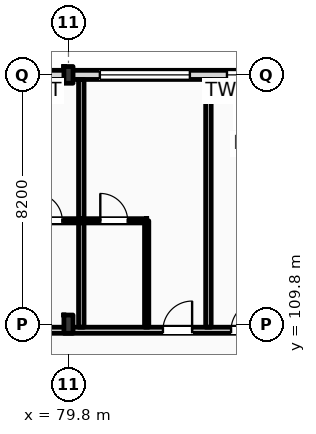
"""IFC4 building model, lengths in metres.
Left out: names, types, materials, properties, quantities, classifications, styles, units other than length and angle.
Written with IfcOpenShell. Run it as: python <this file> out.ifc"""

import sys

from ifc_helpers import new_model, si_unit, direction, frame, frame_2d, origin, origin_2d, place, context, subcontext, project, spatial, rectangle, i_section, extrude, element, fill, save


model = new_model("IFC4")
c1 = context("Model", 3, precision=1e-05, world=origin(), true_north=direction((0.0, 1.0)))
c2 = subcontext(c1, "Body", "Model", "MODEL_VIEW")
j1 = project(units=[si_unit("LENGTHUNIT", "METRE"), si_unit("PLANEANGLEUNIT", "RADIAN")], contexts=[c1])
p1 = place(None, origin())
s1 = spatial("IfcSite", under=j1, at=p1, CompositionType="ELEMENT")
p2 = place(p1, origin())
s2 = spatial("IfcBuilding", under=s1, at=p2, CompositionType="ELEMENT")
p3 = place(p2, frame((0.0, 0.0, 16.2)))
s3 = spatial("IfcBuildingStorey", under=s2, at=p3, CompositionType="ELEMENT", Elevation=16.2)
p4 = place(p3, frame((79.8, 109.8, 0.0), z_axis=(0.0, 0.0, 1.0), x_axis=(1.0, 0.0, 0.0)))
e1 = element("IfcColumn", 1, at=p4, inside=s3, PredefinedType="COLUMN", context=c2, shape_type="SweptSolid", body=[
    extrude(i_section(OverallWidth=0.3, OverallDepth=0.6, WebThickness=0.015, FlangeThickness=0.03, FilletRadius=0.027, at=origin_2d()), origin(), (0.0, 0.0, 1.0), 4.2),
])
p5 = place(p3, frame((79.8, 118.0, 0.0), z_axis=(0.0, 0.0, 1.0), x_axis=(1.0, 0.0, 0.0)))
e2 = element("IfcColumn", 2, at=p5, inside=s3, PredefinedType="COLUMN", context=c2, shape_type="SweptSolid", body=[
    extrude(i_section(OverallWidth=0.3, OverallDepth=0.55, WebThickness=0.015, FlangeThickness=0.029, FilletRadius=0.027, at=origin_2d()), origin(), (0.0, 0.0, 1.0), 4.2),
])
p6 = place(p3, frame((22.5, 118.0, 0.0), z_axis=(0.0, 0.0, 1.0), x_axis=(1.0, 0.0, 0.0)))
e3 = element("IfcWall", 3, at=p6, inside=s3, PredefinedType="STANDARD", context=c2, shape_type="SweptSolid", body=[
    extrude(rectangle(XDim=97.5, YDim=0.3, at=frame_2d((48.75, 0.0))), origin(), (0.0, 0.0, 1.0), 3.36),
])
p7 = place(p6, frame((3.721, 0.0, 0.9)))
e4 = element("IfcOpeningElement", 4, at=p7, cuts=e3, PredefinedType="OPENING", context=c2, shape_type="SweptSolid", body=[
    extrude(rectangle(XDim=0.9, YDim=1.8, at=frame_2d((0.45, 0.9))), frame((0.0, 0.16, 0.0), z_axis=(0.0, -1.0, 0.0), x_axis=(1.0, 0.0, 0.0)), (0.0, 0.0, 1.0), 0.32),
])
p8 = place(p6, frame((6.447, 0.0, 0.9)))
e5 = element("IfcOpeningElement", 5, at=p8, cuts=e3, PredefinedType="OPENING", context=c2, shape_type="SweptSolid", body=[
    extrude(rectangle(XDim=1.35, YDim=1.85, at=frame_2d((0.675, 0.925))), frame((0.0, 0.16, 0.0), z_axis=(0.0, -1.0, 0.0), x_axis=(1.0, 0.0, 0.0)), (0.0, 0.0, 1.0), 0.32),
])
p9 = place(p6, frame((11.363, 0.0, 0.9)))
e6 = element("IfcOpeningElement", 6, at=p9, cuts=e3, PredefinedType="OPENING", context=c2, shape_type="SweptSolid", body=[
    extrude(rectangle(XDim=1.5, YDim=1.9, at=frame_2d((0.75, 0.95))), frame((0.0, 0.16, 0.0), z_axis=(0.0, -1.0, 0.0), x_axis=(1.0, 0.0, 0.0)), (0.0, 0.0, 1.0), 0.32),
])
p10 = place(p6, frame((15.078, 0.0, 0.9)))
e7 = element("IfcOpeningElement", 7, at=p10, cuts=e3, PredefinedType="OPENING", context=c2, shape_type="SweptSolid", body=[
    extrude(rectangle(XDim=1.65, YDim=1.95, at=frame_2d((0.825, 0.975))), frame((0.0, 0.16, 0.0), z_axis=(0.0, -1.0, 0.0), x_axis=(1.0, 0.0, 0.0)), (0.0, 0.0, 1.0), 0.32),
])
p11 = place(p6, frame((19.395, 0.0, 0.9)))
e8 = element("IfcOpeningElement", 8, at=p11, cuts=e3, PredefinedType="OPENING", context=c2, shape_type="SweptSolid", body=[
    extrude(rectangle(XDim=1.8, YDim=2.0, at=frame_2d((0.9, 1.0))), frame((0.0, 0.16, 0.0), z_axis=(0.0, -1.0, 0.0), x_axis=(1.0, 0.0, 0.0)), (0.0, 0.0, 1.0), 0.32),
])
p12 = place(p6, frame((23.31, 0.0, 0.9)))
e9 = element("IfcOpeningElement", 9, at=p12, cuts=e3, PredefinedType="OPENING", context=c2, shape_type="SweptSolid", body=[
    extrude(rectangle(XDim=1.95, YDim=2.05, at=frame_2d((0.975, 1.025))), frame((0.0, 0.16, 0.0), z_axis=(0.0, -1.0, 0.0), x_axis=(1.0, 0.0, 0.0)), (0.0, 0.0, 1.0), 0.32),
])
p13 = place(p6, frame((28.026, 0.0, 0.9)))
e10 = element("IfcOpeningElement", 10, at=p13, cuts=e3, PredefinedType="OPENING", context=c2, shape_type="SweptSolid", body=[
    extrude(rectangle(XDim=2.1, YDim=2.1, at=frame_2d((1.05, 1.05))), frame((0.0, 0.16, 0.0), z_axis=(0.0, -1.0, 0.0), x_axis=(1.0, 0.0, 0.0)), (0.0, 0.0, 1.0), 0.32),
])
p14 = place(p6, frame((31.941, 0.0, 0.9)))
e11 = element("IfcOpeningElement", 11, at=p14, cuts=e3, PredefinedType="OPENING", context=c2, shape_type="SweptSolid", body=[
    extrude(rectangle(XDim=1.1, YDim=2.15, at=frame_2d((0.55, 1.075))), frame((0.0, 0.16, 0.0), z_axis=(0.0, -1.0, 0.0), x_axis=(1.0, 0.0, 0.0)), (0.0, 0.0, 1.0), 0.32),
])
p15 = place(p6, frame((36.657, 0.0, 0.9)))
e12 = element("IfcOpeningElement", 12, at=p15, cuts=e3, PredefinedType="OPENING", context=c2, shape_type="SweptSolid", body=[
    extrude(rectangle(XDim=2.4, YDim=2.2, at=frame_2d((1.2, 1.1))), frame((0.0, 0.16, 0.0), z_axis=(0.0, -1.0, 0.0), x_axis=(1.0, 0.0, 0.0)), (0.0, 0.0, 1.0), 0.32),
])
p16 = place(p6, frame((42.574, 0.0, 0.9)))
e13 = element("IfcOpeningElement", 13, at=p16, cuts=e3, PredefinedType="OPENING", context=c2, shape_type="SweptSolid", body=[
    extrude(rectangle(XDim=1.35, YDim=2.25, at=frame_2d((0.675, 1.125))), frame((0.0, 0.16, 0.0), z_axis=(0.0, -1.0, 0.0), x_axis=(1.0, 0.0, 0.0)), (0.0, 0.0, 1.0), 0.32),
])
p17 = place(p6, frame((45.289, 0.0, 0.9)))
e14 = element("IfcOpeningElement", 14, at=p17, cuts=e3, PredefinedType="OPENING", context=c2, shape_type="SweptSolid", body=[
    extrude(rectangle(XDim=2.7, YDim=2.28, at=frame_2d((1.35, 1.14))), frame((0.0, 0.16, 0.0), z_axis=(0.0, -1.0, 0.0), x_axis=(1.0, 0.0, 0.0)), (0.0, 0.0, 1.0), 0.32),
])
p18 = place(p6, frame((50.406, 0.0, 0.9)))
e15 = element("IfcOpeningElement", 15, at=p18, cuts=e3, PredefinedType="OPENING", context=c2, shape_type="SweptSolid", body=[
    extrude(rectangle(XDim=1.8, YDim=2.28, at=frame_2d((0.9, 1.14))), frame((0.0, 0.16, 0.0), z_axis=(0.0, -1.0, 0.0), x_axis=(1.0, 0.0, 0.0)), (0.0, 0.0, 1.0), 0.32),
])
p19 = place(p6, frame((53.922, 0.0, 0.9)))
e16 = element("IfcOpeningElement", 16, at=p19, cuts=e3, PredefinedType="OPENING", context=c2, shape_type="SweptSolid", body=[
    extrude(rectangle(XDim=1.8, YDim=2.28, at=frame_2d((0.9, 1.14))), frame((0.0, 0.16, 0.0), z_axis=(0.0, -1.0, 0.0), x_axis=(1.0, 0.0, 0.0)), (0.0, 0.0, 1.0), 0.32),
])
p20 = place(p6, frame((58.332, 0.0, 0.9)))
e17 = element("IfcOpeningElement", 17, at=p20, cuts=e3, PredefinedType="OPENING", context=c2, shape_type="SweptSolid", body=[
    extrude(rectangle(XDim=2.961, YDim=2.28, at=frame_2d((1.48, 1.14))), frame((0.0, 0.16, 0.0), z_axis=(0.0, -1.0, 0.0), x_axis=(1.0, 0.0, 0.0)), (0.0, 0.0, 1.0), 0.32),
])
p21 = place(p6, frame((62.513, 0.0, 0.9)))
e18 = element("IfcOpeningElement", 18, at=p21, cuts=e3, PredefinedType="OPENING", context=c2, shape_type="SweptSolid", body=[
    extrude(rectangle(XDim=1.8, YDim=2.28, at=frame_2d((0.9, 1.14))), frame((0.0, 0.16, 0.0), z_axis=(0.0, -1.0, 0.0), x_axis=(1.0, 0.0, 0.0)), (0.0, 0.0, 1.0), 0.32),
])
p22 = place(p6, frame((67.114, 0.0, 0.9)))
e19 = element("IfcOpeningElement", 19, at=p22, cuts=e3, PredefinedType="OPENING", context=c2, shape_type="SweptSolid", body=[
    extrude(rectangle(XDim=2.961, YDim=2.28, at=frame_2d((1.48, 1.14))), frame((0.0, 0.16, 0.0), z_axis=(0.0, -1.0, 0.0), x_axis=(1.0, 0.0, 0.0)), (0.0, 0.0, 1.0), 0.32),
])
p23 = place(p6, frame((73.695, 0.0, 0.9)))
e20 = element("IfcOpeningElement", 20, at=p23, cuts=e3, PredefinedType="OPENING", context=c2, shape_type="SweptSolid", body=[
    extrude(rectangle(XDim=1.1, YDim=2.28, at=frame_2d((0.55, 1.14))), frame((0.0, 0.16, 0.0), z_axis=(0.0, -1.0, 0.0), x_axis=(1.0, 0.0, 0.0)), (0.0, 0.0, 1.0), 0.32),
])
p24 = place(p6, frame((75.895, 0.0, 0.9)))
e21 = element("IfcOpeningElement", 21, at=p24, cuts=e3, PredefinedType="OPENING", context=c2, shape_type="SweptSolid", body=[
    extrude(rectangle(XDim=2.961, YDim=2.28, at=frame_2d((1.48, 1.14))), frame((0.0, 0.16, 0.0), z_axis=(0.0, -1.0, 0.0), x_axis=(1.0, 0.0, 0.0)), (0.0, 0.0, 1.0), 0.32),
])
p25 = place(p6, frame((81.676, 0.0, 0.9)))
e22 = element("IfcOpeningElement", 22, at=p25, cuts=e3, PredefinedType="OPENING", context=c2, shape_type="SweptSolid", body=[
    extrude(rectangle(XDim=1.8, YDim=2.28, at=frame_2d((0.9, 1.14))), frame((0.0, 0.16, 0.0), z_axis=(0.0, -1.0, 0.0), x_axis=(1.0, 0.0, 0.0)), (0.0, 0.0, 1.0), 0.32),
])
p26 = place(p6, frame((84.677, 0.0, 0.9)))
e23 = element("IfcOpeningElement", 23, at=p26, cuts=e3, PredefinedType="OPENING", context=c2, shape_type="SweptSolid", body=[
    extrude(rectangle(XDim=2.961, YDim=2.28, at=frame_2d((1.48, 1.14))), frame((0.0, 0.16, 0.0), z_axis=(0.0, -1.0, 0.0), x_axis=(1.0, 0.0, 0.0)), (0.0, 0.0, 1.0), 0.32),
])
p27 = place(p6, frame((89.999, 0.0, 0.9)))
e24 = element("IfcOpeningElement", 24, at=p27, cuts=e3, PredefinedType="OPENING", context=c2, shape_type="SweptSolid", body=[
    extrude(rectangle(XDim=1.1, YDim=1.5, at=frame_2d((0.55, 0.75))), frame((0.0, 0.16, 0.0), z_axis=(0.0, -1.0, 0.0), x_axis=(1.0, 0.0, 0.0)), (0.0, 0.0, 1.0), 0.32),
])
p28 = place(p6, frame((94.35, 0.0, 0.9)))
e25 = element("IfcOpeningElement", 25, at=p28, cuts=e3, PredefinedType="OPENING", context=c2, shape_type="SweptSolid", body=[
    extrude(rectangle(XDim=1.25, YDim=1.6, at=frame_2d((0.625, 0.8))), frame((0.0, 0.16, 0.0), z_axis=(0.0, -1.0, 0.0), x_axis=(1.0, 0.0, 0.0)), (0.0, 0.0, 1.0), 0.32),
])
p29 = place(p3, frame((10.65, 109.6, 0.0), z_axis=(0.0, 0.0, 1.0), x_axis=(1.0, 0.0, 0.0)))
e26 = element("IfcWall", 26, at=p29, inside=s3, PredefinedType="PARTITIONING", context=c2, shape_type="SweptSolid", body=[
    extrude(rectangle(XDim=109.21, YDim=0.2, at=frame_2d((54.605, 0.0))), origin(), (0.0, 0.0, 1.0), 3.36),
])
p30 = place(p29, frame((15.43, 0.0, 0.0)))
e27 = element("IfcOpeningElement", 27, at=p30, cuts=e26, PredefinedType="OPENING", context=c2, shape_type="SweptSolid", body=[
    extrude(rectangle(XDim=1.02, YDim=2.2, at=frame_2d((0.51, 1.1))), frame((0.0, 0.11, 0.0), z_axis=(0.0, -1.0, 0.0), x_axis=(1.0, 0.0, 0.0)), (0.0, 0.0, 1.0), 0.22),
])
p31 = place(p29, frame((19.537, 0.0, 0.0)))
e28 = element("IfcOpeningElement", 28, at=p31, cuts=e26, PredefinedType="OPENING", context=c2, shape_type="SweptSolid", body=[
    extrude(rectangle(XDim=1.02, YDim=2.2, at=frame_2d((0.51, 1.1))), frame((0.0, 0.11, 0.0), z_axis=(0.0, -1.0, 0.0), x_axis=(1.0, 0.0, 0.0)), (0.0, 0.0, 1.0), 0.22),
])
p32 = place(p29, frame((23.928, 0.0, 0.0)))
e29 = element("IfcOpeningElement", 29, at=p32, cuts=e26, PredefinedType="OPENING", context=c2, shape_type="SweptSolid", body=[
    extrude(rectangle(XDim=1.02, YDim=2.2, at=frame_2d((0.51, 1.1))), frame((0.0, 0.11, 0.0), z_axis=(0.0, -1.0, 0.0), x_axis=(1.0, 0.0, 0.0)), (0.0, 0.0, 1.0), 0.22),
])
p33 = place(p29, frame((26.169, 0.0, 0.0)))
e30 = element("IfcOpeningElement", 30, at=p33, cuts=e26, PredefinedType="OPENING", context=c2, shape_type="SweptSolid", body=[
    extrude(rectangle(XDim=1.02, YDim=2.2, at=frame_2d((0.51, 1.1))), frame((0.0, 0.11, 0.0), z_axis=(0.0, -1.0, 0.0), x_axis=(1.0, 0.0, 0.0)), (0.0, 0.0, 1.0), 0.22),
])
p34 = place(p29, frame((32.739, 0.0, 0.0)))
e31 = element("IfcOpeningElement", 31, at=p34, cuts=e26, PredefinedType="OPENING", context=c2, shape_type="SweptSolid", body=[
    extrude(rectangle(XDim=0.96, YDim=2.2, at=frame_2d((0.48, 1.1))), frame((0.0, 0.11, 0.0), z_axis=(0.0, -1.0, 0.0), x_axis=(1.0, 0.0, 0.0)), (0.0, 0.0, 1.0), 0.22),
])
p35 = place(p29, frame((34.98, 0.0, 0.0)))
e32 = element("IfcOpeningElement", 32, at=p35, cuts=e26, PredefinedType="OPENING", context=c2, shape_type="SweptSolid", body=[
    extrude(rectangle(XDim=0.96, YDim=2.2, at=frame_2d((0.48, 1.1))), frame((0.0, 0.11, 0.0), z_axis=(0.0, -1.0, 0.0), x_axis=(1.0, 0.0, 0.0)), (0.0, 0.0, 1.0), 0.22),
])
p36 = place(p29, frame((41.521, 0.0, 0.0)))
e33 = element("IfcOpeningElement", 33, at=p36, cuts=e26, PredefinedType="OPENING", context=c2, shape_type="SweptSolid", body=[
    extrude(rectangle(XDim=0.96, YDim=2.2, at=frame_2d((0.48, 1.1))), frame((0.0, 0.11, 0.0), z_axis=(0.0, -1.0, 0.0), x_axis=(1.0, 0.0, 0.0)), (0.0, 0.0, 1.0), 0.22),
])
p37 = place(p29, frame((43.512, 0.0, 0.0)))
e34 = element("IfcOpeningElement", 34, at=p37, cuts=e26, PredefinedType="OPENING", context=c2, shape_type="SweptSolid", body=[
    extrude(rectangle(XDim=0.96, YDim=2.2, at=frame_2d((0.48, 1.1))), frame((0.0, 0.11, 0.0), z_axis=(0.0, -1.0, 0.0), x_axis=(1.0, 0.0, 0.0)), (0.0, 0.0, 1.0), 0.22),
])
p38 = place(p29, frame((50.303, 0.0, 0.0)))
e35 = element("IfcOpeningElement", 35, at=p38, cuts=e26, PredefinedType="OPENING", context=c2, shape_type="SweptSolid", body=[
    extrude(rectangle(XDim=0.96, YDim=2.2, at=frame_2d((0.48, 1.1))), frame((0.0, 0.11, 0.0), z_axis=(0.0, -1.0, 0.0), x_axis=(1.0, 0.0, 0.0)), (0.0, 0.0, 1.0), 0.22),
])
p39 = place(p29, frame((54.944, 0.0, 0.0)))
e36 = element("IfcOpeningElement", 36, at=p39, cuts=e26, PredefinedType="OPENING", context=c2, shape_type="SweptSolid", body=[
    extrude(rectangle(XDim=0.96, YDim=2.2, at=frame_2d((0.48, 1.1))), frame((0.0, 0.11, 0.0), z_axis=(0.0, -1.0, 0.0), x_axis=(1.0, 0.0, 0.0)), (0.0, 0.0, 1.0), 0.22),
])
p40 = place(p29, frame((59.085, 0.0, 0.0)))
e37 = element("IfcOpeningElement", 37, at=p40, cuts=e26, PredefinedType="OPENING", context=c2, shape_type="SweptSolid", body=[
    extrude(rectangle(XDim=0.96, YDim=2.2, at=frame_2d((0.48, 1.1))), frame((0.0, 0.11, 0.0), z_axis=(0.0, -1.0, 0.0), x_axis=(1.0, 0.0, 0.0)), (0.0, 0.0, 1.0), 0.22),
])
p41 = place(p29, frame((63.476, 0.0, 0.0)))
e38 = element("IfcOpeningElement", 38, at=p41, cuts=e26, PredefinedType="OPENING", context=c2, shape_type="SweptSolid", body=[
    extrude(rectangle(XDim=0.96, YDim=2.2, at=frame_2d((0.48, 1.1))), frame((0.0, 0.11, 0.0), z_axis=(0.0, -1.0, 0.0), x_axis=(1.0, 0.0, 0.0)), (0.0, 0.0, 1.0), 0.22),
])
p42 = place(p29, frame((65.716, 0.0, 0.0)))
e39 = element("IfcOpeningElement", 39, at=p42, cuts=e26, PredefinedType="OPENING", context=c2, shape_type="SweptSolid", body=[
    extrude(rectangle(XDim=0.96, YDim=2.2, at=frame_2d((0.48, 1.1))), frame((0.0, 0.11, 0.0), z_axis=(0.0, -1.0, 0.0), x_axis=(1.0, 0.0, 0.0)), (0.0, 0.0, 1.0), 0.22),
])
p43 = place(p29, frame((72.257, 0.0, 0.0)))
e40 = element("IfcOpeningElement", 40, at=p43, cuts=e26, PredefinedType="OPENING", context=c2, shape_type="SweptSolid", body=[
    extrude(rectangle(XDim=0.96, YDim=2.2, at=frame_2d((0.48, 1.1))), frame((0.0, 0.11, 0.0), z_axis=(0.0, -1.0, 0.0), x_axis=(1.0, 0.0, 0.0)), (0.0, 0.0, 1.0), 0.22),
])
p44 = place(p29, frame((74.498, 0.0, 0.0)))
e41 = element("IfcOpeningElement", 41, at=p44, cuts=e26, PredefinedType="OPENING", context=c2, shape_type="SweptSolid", body=[
    extrude(rectangle(XDim=0.96, YDim=2.2, at=frame_2d((0.48, 1.1))), frame((0.0, 0.11, 0.0), z_axis=(0.0, -1.0, 0.0), x_axis=(1.0, 0.0, 0.0)), (0.0, 0.0, 1.0), 0.22),
])
p45 = place(p29, frame((81.039, 0.0, 0.0)))
e42 = element("IfcOpeningElement", 42, at=p45, cuts=e26, PredefinedType="OPENING", context=c2, shape_type="SweptSolid", body=[
    extrude(rectangle(XDim=0.96, YDim=2.2, at=frame_2d((0.48, 1.1))), frame((0.0, 0.11, 0.0), z_axis=(0.0, -1.0, 0.0), x_axis=(1.0, 0.0, 0.0)), (0.0, 0.0, 1.0), 0.22),
])
p46 = place(p29, frame((85.68, 0.0, 0.0)))
e43 = element("IfcOpeningElement", 43, at=p46, cuts=e26, PredefinedType="OPENING", context=c2, shape_type="SweptSolid", body=[
    extrude(rectangle(XDim=0.96, YDim=2.2, at=frame_2d((0.48, 1.1))), frame((0.0, 0.11, 0.0), z_axis=(0.0, -1.0, 0.0), x_axis=(1.0, 0.0, 0.0)), (0.0, 0.0, 1.0), 0.22),
])
p47 = place(p29, frame((89.82, 0.0, 0.0)))
e44 = element("IfcOpeningElement", 44, at=p47, cuts=e26, PredefinedType="OPENING", context=c2, shape_type="SweptSolid", body=[
    extrude(rectangle(XDim=0.96, YDim=2.2, at=frame_2d((0.48, 1.1))), frame((0.0, 0.11, 0.0), z_axis=(0.0, -1.0, 0.0), x_axis=(1.0, 0.0, 0.0)), (0.0, 0.0, 1.0), 0.22),
])
p48 = place(p29, frame((94.211, 0.0, 0.0)))
e45 = element("IfcOpeningElement", 45, at=p48, cuts=e26, PredefinedType="OPENING", context=c2, shape_type="SweptSolid", body=[
    extrude(rectangle(XDim=0.96, YDim=2.2, at=frame_2d((0.48, 1.1))), frame((0.0, 0.11, 0.0), z_axis=(0.0, -1.0, 0.0), x_axis=(1.0, 0.0, 0.0)), (0.0, 0.0, 1.0), 0.22),
])
p49 = place(p29, frame((98.602, 0.0, 0.0)))
e46 = element("IfcOpeningElement", 46, at=p49, cuts=e26, PredefinedType="OPENING", context=c2, shape_type="SweptSolid", body=[
    extrude(rectangle(XDim=0.96, YDim=2.2, at=frame_2d((0.48, 1.1))), frame((0.0, 0.11, 0.0), z_axis=(0.0, -1.0, 0.0), x_axis=(1.0, 0.0, 0.0)), (0.0, 0.0, 1.0), 0.22),
])
p50 = place(p29, frame((102.993, 0.0, 0.0)))
e47 = element("IfcOpeningElement", 47, at=p50, cuts=e26, PredefinedType="OPENING", context=c2, shape_type="SweptSolid", body=[
    extrude(rectangle(XDim=0.96, YDim=2.2, at=frame_2d((0.48, 1.1))), frame((0.0, 0.11, 0.0), z_axis=(0.0, -1.0, 0.0), x_axis=(1.0, 0.0, 0.0)), (0.0, 0.0, 1.0), 0.22),
])
p51 = place(p29, frame((105.269, 0.0, 0.0)))
e48 = element("IfcOpeningElement", 48, at=p51, cuts=e26, PredefinedType="OPENING", context=c2, shape_type="SweptSolid", body=[
    extrude(rectangle(XDim=0.96, YDim=2.2, at=frame_2d((0.48, 1.1))), frame((0.0, 0.11, 0.0), z_axis=(0.0, -1.0, 0.0), x_axis=(1.0, 0.0, 0.0)), (0.0, 0.0, 1.0), 0.22),
])
p52 = place(p29, frame((2.716, 0.0, 0.0)))
e49 = element("IfcOpeningElement", 49, at=p52, cuts=e26, PredefinedType="OPENING", context=c2, shape_type="SweptSolid", body=[
    extrude(rectangle(XDim=1.35, YDim=2.25, at=frame_2d((0.675, 1.125))), frame((0.0, 0.11, 0.0), z_axis=(0.0, -1.0, 0.0), x_axis=(1.0, 0.0, 0.0)), (0.0, 0.0, 1.0), 0.22),
])
p53 = place(p29, frame((6.65, 0.0, 0.0)))
e50 = element("IfcOpeningElement", 50, at=p53, cuts=e26, PredefinedType="OPENING", context=c2, shape_type="SweptSolid", body=[
    extrude(rectangle(XDim=1.35, YDim=2.25, at=frame_2d((0.675, 1.125))), frame((0.0, 0.11, 0.0), z_axis=(0.0, -1.0, 0.0), x_axis=(1.0, 0.0, 0.0)), (0.0, 0.0, 1.0), 0.22),
])
p54 = place(p29, frame((10.583, 0.0, 0.0)))
e51 = element("IfcOpeningElement", 51, at=p54, cuts=e26, PredefinedType="OPENING", context=c2, shape_type="SweptSolid", body=[
    extrude(rectangle(XDim=1.35, YDim=2.25, at=frame_2d((0.675, 1.125))), frame((0.0, 0.11, 0.0), z_axis=(0.0, -1.0, 0.0), x_axis=(1.0, 0.0, 0.0)), (0.0, 0.0, 1.0), 0.22),
])
p55 = place(p3, frame((80.222, 109.7, 0.0), z_axis=(0.0, 0.0, 1.0), x_axis=(0.0, 1.0, 0.0)))
e52 = element("IfcWall", 52, at=p55, inside=s3, PredefinedType="PARTITIONING", context=c2, shape_type="SweptSolid", body=[
    extrude(rectangle(XDim=8.15, YDim=0.18, at=frame_2d((4.075, 0.0))), origin(), (0.0, 0.0, 1.0), 3.92),
])
p56 = place(p3, frame((78.072, 113.2, 0.0), z_axis=(0.0, 0.0, 1.0), x_axis=(1.0, 0.0, 0.0)))
e53 = element("IfcWall", 53, at=p56, inside=s3, PredefinedType="PARTITIONING", context=c2, shape_type="SweptSolid", body=[
    extrude(rectangle(XDim=2.15, YDim=0.14, at=frame_2d((1.075, 0.0))), origin(), (0.0, 0.0, 1.0), 3.92),
])
p57 = place(p56, frame((0.625, 0.0, 0.0)))
e54 = element("IfcOpeningElement", 54, at=p57, cuts=e53, PredefinedType="OPENING", context=c2, shape_type="SweptSolid", body=[
    extrude(rectangle(XDim=0.9, YDim=2.1, at=frame_2d((0.45, 1.05))), frame((0.0, 0.08, 0.0), z_axis=(0.0, -1.0, 0.0), x_axis=(1.0, 0.0, 0.0)), (0.0, 0.0, 1.0), 0.16),
])
p58 = place(p3, frame((84.403, 109.7, 0.0), z_axis=(0.0, 0.0, 1.0), x_axis=(0.0, 1.0, 0.0)))
e55 = element("IfcWall", 55, at=p58, inside=s3, PredefinedType="PARTITIONING", context=c2, shape_type="SweptSolid", body=[
    extrude(rectangle(XDim=8.15, YDim=0.18, at=frame_2d((4.075, 0.0))), origin(), (0.0, 0.0, 1.0), 3.92),
])
p59 = place(p3, frame((82.372, 109.7, 0.0), z_axis=(0.0, 0.0, 1.0), x_axis=(0.0, 1.0, 0.0)))
e56 = element("IfcWall", 56, at=p59, inside=s3, PredefinedType="PARTITIONING", context=c2, shape_type="SweptSolid", body=[
    extrude(rectangle(XDim=3.5, YDim=0.14, at=frame_2d((1.75, 0.0))), origin(), (0.0, 0.0, 1.0), 3.61),
])
p60 = place(p3, frame((80.222, 113.2, 0.0), z_axis=(0.0, 0.0, 1.0), x_axis=(1.0, 0.0, 0.0)))
e57 = element("IfcWall", 57, at=p60, inside=s3, PredefinedType="PARTITIONING", context=c2, shape_type="SweptSolid", body=[
    extrude(rectangle(XDim=2.15, YDim=0.14, at=frame_2d((1.075, 0.0))), origin(), (0.0, 0.0, 1.0), 3.92),
])
p61 = place(p60, frame((0.625, 0.0, 0.0)))
e58 = element("IfcOpeningElement", 58, at=p61, cuts=e57, PredefinedType="OPENING", context=c2, shape_type="SweptSolid", body=[
    extrude(rectangle(XDim=0.9, YDim=2.1, at=frame_2d((0.45, 1.05))), frame((0.0, 0.08, 0.0), z_axis=(0.0, -1.0, 0.0), x_axis=(1.0, 0.0, 0.0)), (0.0, 0.0, 1.0), 0.16),
])
p62 = place(p20, origin())
e59 = element("IfcWindow", 59, at=p62, inside=s3, PartitioningType="DOUBLE_PANEL_VERTICAL", PredefinedType="WINDOW", context=c2, shape_type="SweptSolid", body=[
    extrude(rectangle(XDim=2.961, YDim=2.28, at=frame_2d((1.48, 1.14))), frame((0.0, 0.03, 0.0), z_axis=(0.0, -1.0, 0.0), x_axis=(1.0, 0.0, 0.0)), (0.0, 0.0, 1.0), 0.06),
])
fill(e17, e59)
p63 = place(p21, origin())
e60 = element("IfcWindow", 60, at=p63, inside=s3, PartitioningType="DOUBLE_PANEL_VERTICAL", PredefinedType="WINDOW", context=c2, shape_type="SweptSolid", body=[
    extrude(rectangle(XDim=1.8, YDim=2.28, at=frame_2d((0.9, 1.14))), frame((0.0, 0.03, 0.0), z_axis=(0.0, -1.0, 0.0), x_axis=(1.0, 0.0, 0.0)), (0.0, 0.0, 1.0), 0.06),
])
fill(e18, e60)
p64 = place(p57, origin())
e61 = element("IfcDoor", 61, at=p64, inside=s3, OperationType="SINGLE_SWING_LEFT", PredefinedType="DOOR", context=c2, shape_type="SweptSolid", body=[
    extrude(rectangle(XDim=0.9, YDim=2.1, at=frame_2d((0.45, 1.05))), frame((0.0, 0.025, 0.0), z_axis=(0.0, -1.0, 0.0), x_axis=(1.0, 0.0, 0.0)), (0.0, 0.0, 1.0), 0.05),
])
fill(e54, e61)
p65 = place(p43, origin())
e62 = element("IfcDoor", 62, at=p65, inside=s3, OperationType="SINGLE_SWING_RIGHT", PredefinedType="DOOR", context=c2, shape_type="SweptSolid", body=[
    extrude(rectangle(XDim=0.96, YDim=2.2, at=frame_2d((0.48, 1.1))), frame((0.0, 0.025, 0.0), z_axis=(0.0, -1.0, 0.0), x_axis=(1.0, 0.0, 0.0)), (0.0, 0.0, 1.0), 0.05),
])
fill(e40, e62)
p66 = place(p61, origin())
e63 = element("IfcDoor", 63, at=p66, inside=s3, OperationType="SINGLE_SWING_LEFT", PredefinedType="DOOR", context=c2, shape_type="SweptSolid", body=[
    extrude(rectangle(XDim=0.9, YDim=2.1, at=frame_2d((0.45, 1.05))), frame((0.0, 0.025, 0.0), z_axis=(0.0, -1.0, 0.0), x_axis=(1.0, 0.0, 0.0)), (0.0, 0.0, 1.0), 0.05),
])
fill(e58, e63)
p67 = place(p44, origin())
e64 = element("IfcDoor", 64, at=p67, inside=s3, OperationType="SINGLE_SWING_RIGHT", PredefinedType="DOOR", context=c2, shape_type="SweptSolid", body=[
    extrude(rectangle(XDim=0.96, YDim=2.2, at=frame_2d((0.48, 1.1))), frame((0.0, 0.025, 0.0), z_axis=(0.0, -1.0, 0.0), x_axis=(1.0, 0.0, 0.0)), (0.0, 0.0, 1.0), 0.05),
])
fill(e41, e64)
save(model, sys.argv[1])
